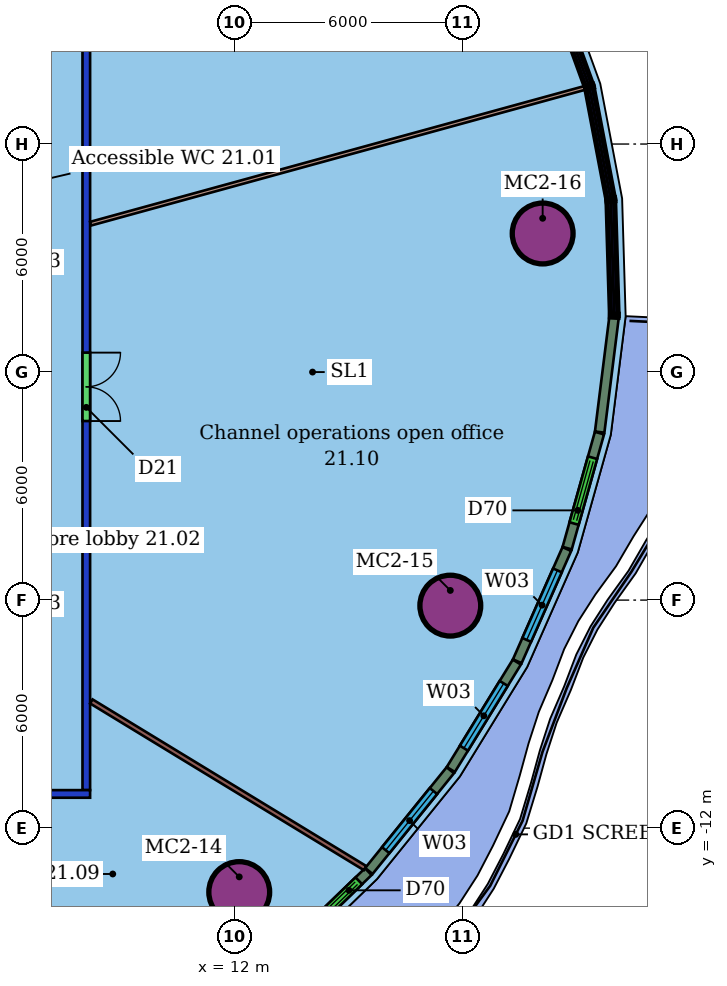
"""IFC4 building model, lengths in metres.
Left out: names, types, materials, properties, quantities, classifications, styles, units other than length and angle.
Written with IfcOpenShell. Run it as: python <this file> out.ifc"""

import sys

from ifc_helpers import new_model, si_unit, direction, frame, frame_2d, origin, origin_2d, place, context, subcontext, project, spatial, rectangle, hollow_circle, extrude, element, fill, save


model = new_model("IFC4")
c1 = context("Model", 3, precision=1e-05, world=origin(), true_north=direction((0.0, 1.0)))
c2 = subcontext(c1, "Body", "Model", "MODEL_VIEW")
j1 = project(units=[si_unit("LENGTHUNIT", "METRE"), si_unit("PLANEANGLEUNIT", "RADIAN")], contexts=[c1])
p1 = place(None, origin())
s1 = spatial("IfcSite", under=j1, at=p1, CompositionType="ELEMENT")
p2 = place(p1, origin())
s2 = spatial("IfcBuilding", under=s1, at=p2, CompositionType="ELEMENT")
p3 = place(p2, frame((0.0, 0.0, 95.8)))
s3 = spatial("IfcBuildingStorey", under=s2, at=p3, CompositionType="ELEMENT", Elevation=95.8)
for number, where, z_axis, x_axis in (
    (1, (12.125, -13.683, 0.0), (0.0, 0.0, 1.0), (1.0, 0.0, 0.0)),
    (2, (17.679, -6.146, 0.0), (0.0, 0.0, 1.0), (1.0, 0.0, 0.0)),
    (3, (20.109, 3.646, 0.0), (0.0, 0.0, 1.0), (1.0, 0.0, 0.0)),
):
    element("IfcColumn", number, at=place(p3, frame(where, z_axis=z_axis, x_axis=x_axis)), inside=s3, PredefinedType="COLUMN", context=c2, shape_type="SweptSolid", body=[
        extrude(hollow_circle(Radius=0.8, WallThickness=0.055, at=origin_2d()), origin(), (0.0, 0.0, 1.0), 3.45),
    ])
p4 = place(p3, frame((8.2, -11.1, 0.0), z_axis=(0.0, 0.0, 1.0), x_axis=(-1.0, 0.0, 0.0)))
e4 = element("IfcWall", 4, at=p4, inside=s3, PredefinedType="PARTITIONING", context=c2, shape_type="SweptSolid", body=[
    extrude(rectangle(XDim=28.4, YDim=0.2, at=frame_2d((14.2, 0.0))), origin(), (0.0, 0.0, 1.0), 3.0),
])
p5 = place(p4, frame((22.249, 0.0, 0.0)))
e5 = element("IfcOpeningElement", 5, at=p5, cuts=e4, PredefinedType="OPENING", context=c2, shape_type="SweptSolid", body=[
    extrude(rectangle(XDim=1.8, YDim=2.1, at=frame_2d((0.9, 1.05))), frame((0.0, 0.11, 0.0), z_axis=(0.0, -1.0, 0.0), x_axis=(1.0, 0.0, 0.0)), (0.0, 0.0, 1.0), 0.22),
])
p6 = place(p4, frame((16.566, 0.0, 0.0)))
e6 = element("IfcOpeningElement", 6, at=p6, cuts=e4, PredefinedType="OPENING", context=c2, shape_type="SweptSolid", body=[
    extrude(rectangle(XDim=1.0, YDim=2.1, at=frame_2d((0.5, 1.05))), frame((0.0, 0.11, 0.0), z_axis=(0.0, -1.0, 0.0), x_axis=(1.0, 0.0, 0.0)), (0.0, 0.0, 1.0), 0.22),
])
p7 = place(p4, frame((7.767, 0.0, 0.0)))
e7 = element("IfcOpeningElement", 7, at=p7, cuts=e4, PredefinedType="OPENING", context=c2, shape_type="SweptSolid", body=[
    extrude(rectangle(XDim=1.5, YDim=2.1, at=frame_2d((0.75, 1.05))), frame((0.0, 0.11, 0.0), z_axis=(0.0, -1.0, 0.0), x_axis=(1.0, 0.0, 0.0)), (0.0, 0.0, 1.0), 0.22),
])
p8 = place(p4, frame((1.937, 0.0, 0.0)))
e8 = element("IfcOpeningElement", 8, at=p8, cuts=e4, PredefinedType="OPENING", context=c2, shape_type="SweptSolid", body=[
    extrude(rectangle(XDim=1.0, YDim=2.4, at=frame_2d((0.5, 1.2))), frame((0.0, 0.11, 0.0), z_axis=(0.0, -1.0, 0.0), x_axis=(1.0, 0.0, 0.0)), (0.0, 0.0, 1.0), 0.22),
])
p9 = place(p3, frame((8.1, 11.0, 0.0), z_axis=(0.0, 0.0, 1.0), x_axis=(0.0, -1.0, 0.0)))
e9 = element("IfcWall", 9, at=p9, inside=s3, PredefinedType="PARTITIONING", context=c2, shape_type="SweptSolid", body=[
    extrude(rectangle(XDim=22.0, YDim=0.2, at=frame_2d((11.0, 0.0))), origin(), (0.0, 0.0, 1.0), 3.0),
])
p10 = place(p9, frame((10.488, 0.0, 0.0)))
e10 = element("IfcOpeningElement", 10, at=p10, cuts=e9, PredefinedType="OPENING", context=c2, shape_type="SweptSolid", body=[
    extrude(rectangle(XDim=1.8, YDim=2.1, at=frame_2d((0.9, 1.05))), frame((0.0, 0.11, 0.0), z_axis=(0.0, -1.0, 0.0), x_axis=(1.0, 0.0, 0.0)), (0.0, 0.0, 1.0), 0.22),
])
p11 = place(p3, frame((21.215, 7.476, 0.0), z_axis=(0.0, 0.0, 1.0), x_axis=(-0.964278731445, -0.264889652652, 0.0)))
e11 = element("IfcWall", 11, at=p11, inside=s3, PredefinedType="PARTITIONING", context=c2, shape_type="SweptSolid", body=[
    extrude(rectangle(XDim=13.483, YDim=0.1, at=frame_2d((6.742, 0.0))), origin(), (0.0, 0.0, 1.0), 3.45),
])
p12 = place(p3, frame((10.078, -17.658, 0.0), z_axis=(0.0, 0.0, 1.0), x_axis=(-0.673256605977, 0.739408914275, 0.0)))
e12 = element("IfcWall", 12, at=p12, inside=s3, PredefinedType="PARTITIONING", context=c2, shape_type="SweptSolid", body=[
    extrude(rectangle(XDim=8.677, YDim=0.125, at=frame_2d((4.338, 0.0))), origin(), (0.0, 0.0, 1.0), 3.45),
])
p13 = place(p3, frame((15.437, -13.052, 0.0), z_axis=(0.0, 0.0, 1.0), x_axis=(-0.85412644294, 0.520065399224, 0.0)))
e13 = element("IfcWall", 13, at=p13, inside=s3, PredefinedType="PARTITIONING", context=c2, shape_type="SweptSolid", body=[
    extrude(rectangle(XDim=8.435, YDim=0.125, at=frame_2d((4.217, 0.0))), origin(), (0.0, 0.0, 1.0), 3.45),
])
p14 = place(p3, frame((13.01, -15.574, 0.0), z_axis=(0.0, 0.0, 1.0), x_axis=(0.718578482656, 0.695445874432, 0.0)))
e14 = element("IfcWall", 14, at=p14, inside=s3, PredefinedType="SOLIDWALL", context=c2, shape_type="SweptSolid", body=[
    extrude(rectangle(XDim=3.493, YDim=0.25, at=frame_2d((1.747, 0.0))), origin(), (0.0, 0.0, 1.0), 3.05),
])
p15 = place(p14, frame((1.347, 0.0, 0.0)))
e15 = element("IfcOpeningElement", 15, at=p15, cuts=e14, PredefinedType="OPENING", context=c2, shape_type="SweptSolid", body=[
    extrude(rectangle(XDim=1.8, YDim=2.4, at=frame_2d((0.9, 1.2))), frame((0.0, 0.135, 0.0), z_axis=(0.0, -1.0, 0.0), x_axis=(1.0, 0.0, 0.0)), (0.0, 0.0, 1.0), 0.27),
])
p16 = place(p3, frame((15.536, -13.128, 0.0), z_axis=(0.0, 0.0, 1.0), x_axis=(0.62851383429, 0.777798405826, 0.0)))
e16 = element("IfcWall", 16, at=p16, inside=s3, PredefinedType="SOLIDWALL", context=c2, shape_type="SweptSolid", body=[
    extrude(rectangle(XDim=3.408, YDim=0.25, at=frame_2d((1.704, 0.0))), origin(), (0.0, 0.0, 1.0), 3.05),
])
p17 = place(p16, frame((0.704, 0.0, 0.9)))
e17 = element("IfcOpeningElement", 17, at=p17, cuts=e16, PredefinedType="OPENING", context=c2, shape_type="SweptSolid", body=[
    extrude(rectangle(XDim=2.0, YDim=2.1, at=frame_2d((1.0, 1.05))), frame((0.0, 0.135, 0.0), z_axis=(0.0, -1.0, 0.0), x_axis=(1.0, 0.0, 0.0)), (0.0, 0.0, 1.0), 0.27),
])
p18 = place(p3, frame((17.692, -10.457, 0.0), z_axis=(0.0, 0.0, 1.0), x_axis=(0.523740167925, 0.851878064339, 0.0)))
e18 = element("IfcWall", 18, at=p18, inside=s3, PredefinedType="SOLIDWALL", context=c2, shape_type="SweptSolid", body=[
    extrude(rectangle(XDim=3.318, YDim=0.25, at=frame_2d((1.659, 0.0))), origin(), (0.0, 0.0, 1.0), 3.05),
])
p19 = place(p18, frame((0.659, 0.0, 0.9)))
e19 = element("IfcOpeningElement", 19, at=p19, cuts=e18, PredefinedType="OPENING", context=c2, shape_type="SweptSolid", body=[
    extrude(rectangle(XDim=2.0, YDim=2.1, at=frame_2d((1.0, 1.05))), frame((0.0, 0.135, 0.0), z_axis=(0.0, -1.0, 0.0), x_axis=(1.0, 0.0, 0.0)), (0.0, 0.0, 1.0), 0.27),
])
p20 = place(p3, frame((19.441, -7.609, 0.0), z_axis=(0.0, 0.0, 1.0), x_axis=(0.404074069782, 0.914726268416, 0.0)))
e20 = element("IfcWall", 20, at=p20, inside=s3, PredefinedType="SOLIDWALL", context=c2, shape_type="SweptSolid", body=[
    extrude(rectangle(XDim=3.228, YDim=0.25, at=frame_2d((1.614, 0.0))), origin(), (0.0, 0.0, 1.0), 3.05),
])
p21 = place(p20, frame((0.614, 0.0, 0.9)))
e21 = element("IfcOpeningElement", 21, at=p21, cuts=e20, PredefinedType="OPENING", context=c2, shape_type="SweptSolid", body=[
    extrude(rectangle(XDim=2.0, YDim=2.1, at=frame_2d((1.0, 1.05))), frame((0.0, 0.135, 0.0), z_axis=(0.0, -1.0, 0.0), x_axis=(1.0, 0.0, 0.0)), (0.0, 0.0, 1.0), 0.27),
])
p22 = place(p3, frame((20.754, -4.633, 0.0), z_axis=(0.0, 0.0, 1.0), x_axis=(0.27027785562, 0.962782364173, 0.0)))
e22 = element("IfcWall", 22, at=p22, inside=s3, PredefinedType="SOLIDWALL", context=c2, shape_type="SweptSolid", body=[
    extrude(rectangle(XDim=3.144, YDim=0.25, at=frame_2d((1.572, 0.0))), origin(), (0.0, 0.0, 1.0), 3.05),
])
p23 = place(p22, frame((0.672, 0.0, 0.0)))
e23 = element("IfcOpeningElement", 23, at=p23, cuts=e22, PredefinedType="OPENING", context=c2, shape_type="SweptSolid", body=[
    extrude(rectangle(XDim=1.8, YDim=2.4, at=frame_2d((0.9, 1.2))), frame((0.0, 0.135, 0.0), z_axis=(0.0, -1.0, 0.0), x_axis=(1.0, 0.0, 0.0)), (0.0, 0.0, 1.0), 0.27),
])
p24 = place(p3, frame((21.609, -1.579, 0.0), z_axis=(0.0, 0.0, 1.0), x_axis=(0.124351721446, 0.992238201932, 0.0)))
e24 = element("IfcWall", 24, at=p24, inside=s3, PredefinedType="SOLIDWALL", context=c2, shape_type="SweptSolid", body=[
    extrude(rectangle(XDim=3.033, YDim=0.25, at=frame_2d((1.517, 0.0))), origin(), (0.0, 0.0, 1.0), 3.05),
])
p25 = place(p10, origin())
e25 = element("IfcDoor", 25, at=p25, inside=s3, OperationType="DOUBLE_DOOR_SINGLE_SWING", PredefinedType="DOOR", context=c2, shape_type="SweptSolid", body=[
    extrude(rectangle(XDim=1.8, YDim=2.1, at=frame_2d((0.9, 1.05))), frame((0.0, 0.025, 0.0), z_axis=(0.0, -1.0, 0.0), x_axis=(1.0, 0.0, 0.0)), (0.0, 0.0, 1.0), 0.05),
])
fill(e10, e25)
p26 = place(p15, origin())
e26 = element("IfcDoor", 26, at=p26, inside=s3, OperationType="DOUBLE_DOOR_SLIDING", PredefinedType="DOOR", context=c2, shape_type="SweptSolid", body=[
    extrude(rectangle(XDim=1.8, YDim=2.4, at=frame_2d((0.9, 1.2))), frame((0.0, 0.025, 0.0), z_axis=(0.0, -1.0, 0.0), x_axis=(1.0, 0.0, 0.0)), (0.0, 0.0, 1.0), 0.05),
])
fill(e15, e26)
p27 = place(p17, origin())
e27 = element("IfcWindow", 27, at=p27, inside=s3, PartitioningType="SINGLE_PANEL", PredefinedType="WINDOW", context=c2, shape_type="SweptSolid", body=[
    extrude(rectangle(XDim=2.0, YDim=2.1, at=frame_2d((1.0, 1.05))), frame((0.0, 0.03, 0.0), z_axis=(0.0, -1.0, 0.0), x_axis=(1.0, 0.0, 0.0)), (0.0, 0.0, 1.0), 0.06),
])
fill(e17, e27)
p28 = place(p19, origin())
e28 = element("IfcWindow", 28, at=p28, inside=s3, PartitioningType="SINGLE_PANEL", PredefinedType="WINDOW", context=c2, shape_type="SweptSolid", body=[
    extrude(rectangle(XDim=2.0, YDim=2.1, at=frame_2d((1.0, 1.05))), frame((0.0, 0.03, 0.0), z_axis=(0.0, -1.0, 0.0), x_axis=(1.0, 0.0, 0.0)), (0.0, 0.0, 1.0), 0.06),
])
fill(e19, e28)
p29 = place(p21, origin())
e29 = element("IfcWindow", 29, at=p29, inside=s3, PartitioningType="SINGLE_PANEL", PredefinedType="WINDOW", context=c2, shape_type="SweptSolid", body=[
    extrude(rectangle(XDim=2.0, YDim=2.1, at=frame_2d((1.0, 1.05))), frame((0.0, 0.03, 0.0), z_axis=(0.0, -1.0, 0.0), x_axis=(1.0, 0.0, 0.0)), (0.0, 0.0, 1.0), 0.06),
])
fill(e21, e29)
p30 = place(p23, origin())
e30 = element("IfcDoor", 30, at=p30, inside=s3, OperationType="DOUBLE_DOOR_SLIDING", PredefinedType="DOOR", context=c2, shape_type="SweptSolid", body=[
    extrude(rectangle(XDim=1.8, YDim=2.4, at=frame_2d((0.9, 1.2))), frame((0.0, 0.025, 0.0), z_axis=(0.0, -1.0, 0.0), x_axis=(1.0, 0.0, 0.0)), (0.0, 0.0, 1.0), 0.05),
])
fill(e23, e30)
save(model, sys.argv[1])
